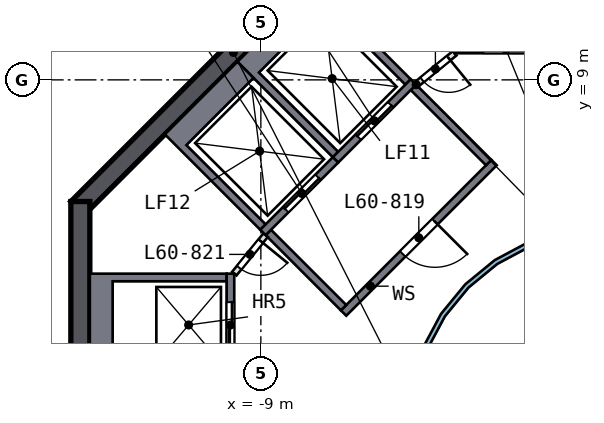
"""IFC4 building model, lengths in metres.
Left out: names, types, materials, properties, quantities, classifications, styles, units other than length and angle.
Written with IfcOpenShell. Run it as: python <this file> out.ifc"""

import sys

from ifc_helpers import new_model, si_unit, direction, frame, frame_2d, origin, place, context, subcontext, project, spatial, polyline, rectangle, outline, extrude, element, fill, save


model = new_model("IFC4")
c1 = context("Model", 3, precision=1e-05, world=origin(), true_north=direction((0.0, 1.0)))
c2 = subcontext(c1, "Body", "Model", "MODEL_VIEW")
j1 = project(units=[si_unit("LENGTHUNIT", "METRE"), si_unit("PLANEANGLEUNIT", "RADIAN")], contexts=[c1])
p1 = place(None, origin())
s1 = spatial("IfcSite", under=j1, at=p1, CompositionType="ELEMENT")
p2 = place(p1, origin())
s2 = spatial("IfcBuilding", under=s1, at=p2, CompositionType="ELEMENT")
p3 = place(p2, frame((0.0, 0.0, 244.5)))
s3 = spatial("IfcBuildingStorey", under=s2, at=p3, CompositionType="ELEMENT", Elevation=244.5)
p4 = place(p3, frame((-5.622, 13.823, 0.0), z_axis=(0.0, 0.0, 1.0), x_axis=(-0.707106781, -0.707106781, 0.0)))
e1 = element("IfcWall", 1, at=p4, inside=s3, PredefinedType="SHEAR", context=c2, shape_type="SweptSolid", body=[
    extrude(rectangle(XDim=11.598, YDim=0.5, at=frame_2d((5.799, 0.0))), origin(), (0.0, 0.0, 1.0), 3.5),
])
p5 = place(p3, frame((-13.75, 5.799, 0.0), z_axis=(0.0, 0.0, 1.0), x_axis=(0.0, -1.0, 0.0)))
e2 = element("IfcWall", 2, at=p5, inside=s3, PredefinedType="SHEAR", context=c2, shape_type="SweptSolid", body=[
    extrude(rectangle(XDim=11.598, YDim=0.5, at=frame_2d((5.799, 0.0))), origin(), (0.0, 0.0, 1.0), 3.5),
])
p6 = place(p5, frame((4.899, 0.0, 0.0)))
e3 = element("IfcOpeningElement", 3, at=p6, cuts=e2, PredefinedType="OPENING", context=c2, shape_type="SweptSolid", body=[
    extrude(rectangle(XDim=1.8, YDim=2.1, at=frame_2d((0.9, 1.05))), frame((0.0, 0.26, 0.0), z_axis=(0.0, -1.0, 0.0), x_axis=(1.0, 0.0, 0.0)), (0.0, 0.0, 1.0), 0.52),
])
p7 = place(p3, frame((-1.2, 9.8, 0.0), z_axis=(0.0, 0.0, 1.0), x_axis=(-1.0, 0.0, 0.0)))
e4 = element("IfcWall", 4, at=p7, inside=s3, PredefinedType="SOLIDWALL", context=c2, shape_type="SweptSolid", body=[
    extrude(rectangle(XDim=2.7, YDim=0.2, at=frame_2d((1.35, 0.0))), origin(), (0.0, 0.0, 1.0), 3.19),
])
p8 = place(p7, frame((0.75, 0.0, 0.0)))
e5 = element("IfcOpeningElement", 5, at=p8, cuts=e4, PredefinedType="OPENING", context=c2, shape_type="SweptSolid", body=[
    extrude(rectangle(XDim=1.2, YDim=2.1, at=frame_2d((0.6, 1.05))), frame((0.0, 0.11, 0.0), z_axis=(0.0, -1.0, 0.0), x_axis=(1.0, 0.0, 0.0)), (0.0, 0.0, 1.0), 0.22),
])
p9 = place(p3, origin())
e6 = element("IfcWall", 6, at=p9, inside=s3, PredefinedType="SOLIDWALL", context=c2, shape_type="SweptSolid", body=[
    extrude(outline(polyline([(-13.5, 3.9), (-9.9, 3.9), (-9.9, 3.7), (-12.9, 3.7), (-12.9, 1.4), (-9.9, 1.4), (-9.9, 1.2), (-13.5, 1.2), (-13.5, 3.9)])), origin(), (0.0, 0.0, 1.0), 3.19),
])
p10 = place(p3, frame((-9.8, 1.2, 0.0), z_axis=(0.0, 0.0, 1.0), x_axis=(0.0, 1.0, 0.0)))
e7 = element("IfcWall", 7, at=p10, inside=s3, PredefinedType="SOLIDWALL", context=c2, shape_type="SweptSolid", body=[
    extrude(rectangle(XDim=2.7, YDim=0.2, at=frame_2d((1.35, 0.0))), origin(), (0.0, 0.0, 1.0), 3.19),
])
p11 = place(p10, frame((0.75, 0.0, 0.0)))
e8 = element("IfcOpeningElement", 8, at=p11, cuts=e7, PredefinedType="OPENING", context=c2, shape_type="SweptSolid", body=[
    extrude(rectangle(XDim=1.2, YDim=2.1, at=frame_2d((0.6, 1.05))), frame((0.0, 0.11, 0.0), z_axis=(0.0, -1.0, 0.0), x_axis=(1.0, 0.0, 0.0)), (0.0, 0.0, 1.0), 0.22),
])
p12 = place(p3, origin())
e9 = element("IfcWall", 9, at=p12, inside=s3, PredefinedType="SOLIDWALL", context=c2, shape_type="SweptSolid", body=[
    extrude(outline(polyline([(-9.617, 9.475), (-7.566, 11.526), (-5.056, 9.016), (-5.197, 8.874), (-7.283, 10.96), (-9.051, 9.192), (-6.965, 7.106), (-7.106, 6.965), (-9.617, 9.475)])), origin(), (0.0, 0.0, 1.0), 3.19),
])
p13 = place(p3, frame((-4.985, 8.945, 0.0), z_axis=(0.0, 0.0, 1.0), x_axis=(-0.707106781, -0.707106781, 0.0)))
e10 = element("IfcWall", 10, at=p13, inside=s3, PredefinedType="SOLIDWALL", context=c2, shape_type="SweptSolid", body=[
    extrude(rectangle(XDim=2.9, YDim=0.2, at=frame_2d((1.45, 0.0))), origin(), (0.0, 0.0, 1.0), 3.19),
])
p14 = place(p13, frame((0.85, 0.0, 0.0)))
e11 = element("IfcOpeningElement", 11, at=p14, cuts=e10, PredefinedType="OPENING", context=c2, shape_type="SweptSolid", body=[
    extrude(rectangle(XDim=1.2, YDim=2.1, at=frame_2d((0.6, 1.05))), frame((0.0, 0.11, 0.0), z_axis=(0.0, -1.0, 0.0), x_axis=(1.0, 0.0, 0.0)), (0.0, 0.0, 1.0), 0.22),
])
p15 = place(p3, origin())
e12 = element("IfcWall", 12, at=p15, inside=s3, PredefinedType="SOLIDWALL", context=c2, shape_type="SweptSolid", body=[
    extrude(outline(polyline([(-11.526, 7.566), (-9.617, 9.475), (-9.192, 9.051), (-10.96, 7.283), (-8.874, 5.197), (-9.016, 5.056), (-11.526, 7.566)])), origin(), (0.0, 0.0, 1.0), 3.19),
])
p16 = place(p3, frame((-7.036, 6.894, 0.0), z_axis=(0.0, 0.0, 1.0), x_axis=(-0.707106781, -0.707106781, 0.0)))
e13 = element("IfcWall", 13, at=p16, inside=s3, PredefinedType="SOLIDWALL", context=c2, shape_type="SweptSolid", body=[
    extrude(rectangle(XDim=2.7, YDim=0.2, at=frame_2d((1.35, 0.0))), origin(), (0.0, 0.0, 1.0), 3.19),
])
p17 = place(p16, frame((0.65, 0.0, 0.0)))
e14 = element("IfcOpeningElement", 14, at=p17, cuts=e13, PredefinedType="OPENING", context=c2, shape_type="SweptSolid", body=[
    extrude(rectangle(XDim=1.2, YDim=2.1, at=frame_2d((0.6, 1.05))), frame((0.0, 0.11, 0.0), z_axis=(0.0, -1.0, 0.0), x_axis=(1.0, 0.0, 0.0)), (0.0, 0.0, 1.0), 0.22),
])
p18 = place(p3, frame((-2.864, 6.823, 0.0), z_axis=(0.0, 0.0, 1.0), x_axis=(-0.707106781, -0.707106781, 0.0)))
e15 = element("IfcWall", 15, at=p18, inside=s3, PredefinedType="SOLIDWALL", context=c2, shape_type="SweptSolid", body=[
    extrude(rectangle(XDim=5.6, YDim=0.2, at=frame_2d((2.8, 0.0))), origin(), (0.0, 0.0, 1.0), 3.19),
])
p19 = place(p18, frame((2.2, 0.0, 0.0)))
e16 = element("IfcOpeningElement", 16, at=p19, cuts=e15, PredefinedType="OPENING", context=c2, shape_type="SweptSolid", body=[
    extrude(rectangle(XDim=1.2, YDim=2.1, at=frame_2d((0.6, 1.05))), frame((0.0, 0.11, 0.0), z_axis=(0.0, -1.0, 0.0), x_axis=(1.0, 0.0, 0.0)), (0.0, 0.0, 1.0), 0.22),
])
for number, where, z_axis, x_axis in (
    (17, (-3.005, 6.823, 0.0), (0.0, 0.0, 1.0), (-0.707, 0.707, 0.0)),
    (18, (-6.823, 3.005, 0.0), (0.0, 0.0, 1.0), (-0.707, 0.707, 0.0)),
):
    element("IfcWall", number, at=place(p3, frame(where, z_axis=z_axis, x_axis=x_axis)), inside=s3, PredefinedType="SOLIDWALL", context=c2, shape_type="SweptSolid", body=[
        extrude(rectangle(XDim=2.8, YDim=0.2, at=frame_2d((1.4, 0.0))), origin(), (0.0, 0.0, 1.0), 3.19),
    ])
p20 = place(p3, frame((-3.9, 9.7, 0.0), z_axis=(0.0, 0.0, 1.0), x_axis=(-0.775559878, -0.631274009, 0.0)))
e19 = element("IfcWall", 19, at=p20, inside=s3, PredefinedType="PARTITIONING", context=c2, shape_type="SweptSolid", body=[
    extrude(rectangle(XDim=1.308, YDim=0.15, at=frame_2d((0.654, 0.0))), origin(), (0.0, 0.0, 1.0), 3.19),
])
p21 = place(p20, frame((0.204, 0.0, 0.0)))
e20 = element("IfcOpeningElement", 20, at=p21, cuts=e19, PredefinedType="OPENING", context=c2, shape_type="SweptSolid", body=[
    extrude(rectangle(XDim=0.9, YDim=2.1, at=frame_2d((0.45, 1.05))), frame((0.0, 0.085, 0.0), z_axis=(0.0, -1.0, 0.0), x_axis=(1.0, 0.0, 0.0)), (0.0, 0.0, 1.0), 0.17),
])
p22 = place(p3, frame((-8.874, 4.914, 0.0), z_axis=(0.0, 0.0, 1.0), x_axis=(-0.631274009, -0.775559878, 0.0)))
e21 = element("IfcWall", 21, at=p22, inside=s3, PredefinedType="PARTITIONING", context=c2, shape_type="SweptSolid", body=[
    extrude(rectangle(XDim=1.308, YDim=0.15, at=frame_2d((0.654, 0.0))), origin(), (0.0, 0.0, 1.0), 3.19),
])
p23 = place(p22, frame((0.204, 0.0, 0.0)))
e22 = element("IfcOpeningElement", 22, at=p23, cuts=e21, PredefinedType="OPENING", context=c2, shape_type="SweptSolid", body=[
    extrude(rectangle(XDim=0.9, YDim=2.1, at=frame_2d((0.45, 1.05))), frame((0.0, 0.085, 0.0), z_axis=(0.0, -1.0, 0.0), x_axis=(1.0, 0.0, 0.0)), (0.0, 0.0, 1.0), 0.17),
])
p24 = place(p3, origin())
e23 = element("IfcWall", 23, at=p24, inside=s3, PredefinedType="SOLIDWALL", context=c2, shape_type="SweptSolid", body=[
    extrude(outline(polyline([(5.021, -0.999), (4.73, -1.959), (4.257, -2.844), (3.62, -3.62), (2.844, -4.257), (1.959, -4.73), (0.999, -5.021), (0.0, -5.12), (-0.999, -5.021), (-1.959, -4.73), (-2.844, -4.257), (-3.62, -3.62), (-4.257, -2.844), (-4.73, -1.959), (-5.021, -0.999), (-5.12, 0.0), (-5.021, 0.999), (-4.73, 1.959), (-4.257, 2.844), (-3.62, 3.62), (-2.844, 4.257), (-1.959, 4.73), (-0.999, 5.021), (0.0, 5.12), (0.999, 5.021), (1.959, 4.73), (2.844, 4.257), (3.62, 3.62), (4.257, 2.844), (4.73, 1.959), (5.021, 0.999), (5.12, 0.0), (5.021, -0.999)]), holes=[polyline([(4.904, 0.976), (4.619, 1.913), (4.157, 2.778), (3.535, 3.535), (2.778, 4.157), (1.913, 4.619), (0.976, 4.904), (0.0, 5.0), (-0.976, 4.904), (-1.913, 4.619), (-2.778, 4.157), (-3.535, 3.535), (-4.157, 2.778), (-4.619, 1.913), (-4.904, 0.976), (-5.0, 0.0), (-4.904, -0.976), (-4.619, -1.913), (-4.157, -2.778), (-3.535, -3.535), (-2.778, -4.157), (-1.913, -4.619), (-0.976, -4.904), (0.0, -5.0), (0.976, -4.904), (1.913, -4.619), (2.778, -4.157), (3.535, -3.535), (4.157, -2.778), (4.619, -1.913), (4.904, -0.976), (5.0, 0.0), (4.904, 0.976)])]), origin(), (0.0, 0.0, 1.0), 3.19),
])
p25 = place(p3, frame((-16.903, 7.231, 0.0), z_axis=(0.0, 0.0, 1.0), x_axis=(0.617851641, 0.786294696, 0.0)))
e24 = element("IfcWall", 24, at=p25, inside=s3, PredefinedType="SOLIDWALL", context=c2, shape_type="SweptSolid", body=[
    extrude(rectangle(XDim=9.317, YDim=0.2, at=frame_2d((4.658, 0.0))), origin(), (0.0, 0.0, 1.0), 3.19),
])
p26 = place(p25, frame((3.854, 0.0, 0.0)))
e25 = element("IfcOpeningElement", 25, at=p26, cuts=e24, PredefinedType="OPENING", context=c2, shape_type="SweptSolid", body=[
    extrude(rectangle(XDim=1.8, YDim=2.1, at=frame_2d((0.9, 1.05))), frame((0.0, 0.11, 0.0), z_axis=(0.0, -1.0, 0.0), x_axis=(1.0, 0.0, 0.0)), (0.0, 0.0, 1.0), 0.22),
])
p27 = place(p11, origin())
e26 = element("IfcDoor", 26, at=p27, inside=s3, OperationType="DOUBLE_DOOR_SLIDING", PredefinedType="DOOR", context=c2, shape_type="SweptSolid", body=[
    extrude(rectangle(XDim=1.2, YDim=2.1, at=frame_2d((0.6, 1.05))), frame((0.0, 0.025, 0.0), z_axis=(0.0, -1.0, 0.0), x_axis=(1.0, 0.0, 0.0)), (0.0, 0.0, 1.0), 0.05),
])
fill(e8, e26)
p28 = place(p14, origin())
e27 = element("IfcDoor", 27, at=p28, inside=s3, OperationType="DOUBLE_DOOR_SLIDING", PredefinedType="DOOR", context=c2, shape_type="SweptSolid", body=[
    extrude(rectangle(XDim=1.2, YDim=2.1, at=frame_2d((0.6, 1.05))), frame((0.0, 0.025, 0.0), z_axis=(0.0, -1.0, 0.0), x_axis=(1.0, 0.0, 0.0)), (0.0, 0.0, 1.0), 0.05),
])
fill(e11, e27)
p29 = place(p17, origin())
e28 = element("IfcDoor", 28, at=p29, inside=s3, OperationType="DOUBLE_DOOR_SLIDING", PredefinedType="DOOR", context=c2, shape_type="SweptSolid", body=[
    extrude(rectangle(XDim=1.2, YDim=2.1, at=frame_2d((0.6, 1.05))), frame((0.0, 0.025, 0.0), z_axis=(0.0, -1.0, 0.0), x_axis=(1.0, 0.0, 0.0)), (0.0, 0.0, 1.0), 0.05),
])
fill(e14, e28)
p30 = place(p19, origin())
e29 = element("IfcDoor", 29, at=p30, inside=s3, OperationType="SINGLE_SWING_LEFT", PredefinedType="DOOR", context=c2, shape_type="SweptSolid", body=[
    extrude(rectangle(XDim=1.2, YDim=2.1, at=frame_2d((0.6, 1.05))), frame((0.0, 0.025, 0.0), z_axis=(0.0, -1.0, 0.0), x_axis=(1.0, 0.0, 0.0)), (0.0, 0.0, 1.0), 0.05),
])
fill(e16, e29)
p31 = place(p21, origin())
e30 = element("IfcDoor", 30, at=p31, inside=s3, OperationType="SINGLE_SWING_LEFT", PredefinedType="DOOR", context=c2, shape_type="SweptSolid", body=[
    extrude(rectangle(XDim=0.9, YDim=2.1, at=frame_2d((0.45, 1.05))), frame((0.0, 0.025, 0.0), z_axis=(0.0, -1.0, 0.0), x_axis=(1.0, 0.0, 0.0)), (0.0, 0.0, 1.0), 0.05),
])
fill(e20, e30)
p32 = place(p23, origin())
e31 = element("IfcDoor", 31, at=p32, inside=s3, OperationType="SINGLE_SWING_LEFT", PredefinedType="DOOR", context=c2, shape_type="SweptSolid", body=[
    extrude(rectangle(XDim=0.9, YDim=2.1, at=frame_2d((0.45, 1.05))), frame((0.0, 0.025, 0.0), z_axis=(0.0, -1.0, 0.0), x_axis=(1.0, 0.0, 0.0)), (0.0, 0.0, 1.0), 0.05),
])
fill(e22, e31)
save(model, sys.argv[1])
